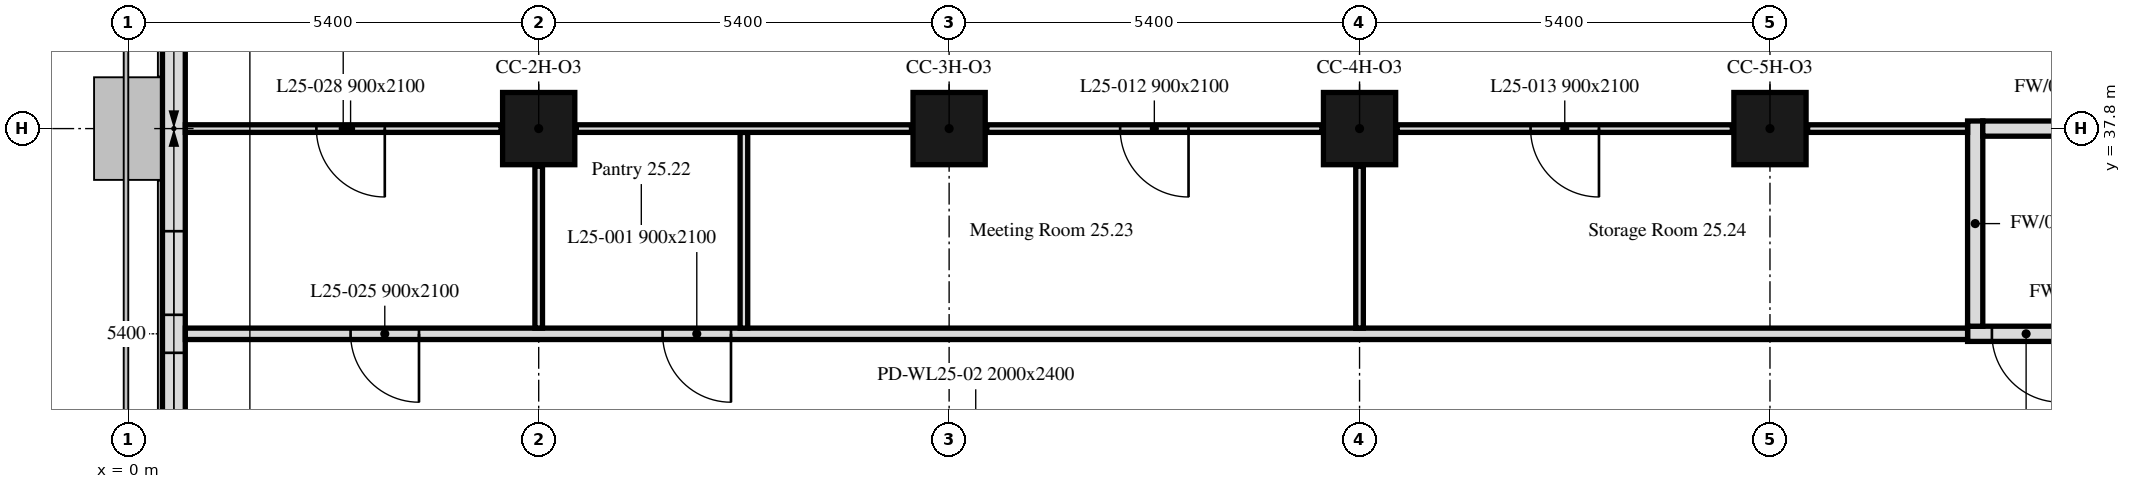
"""IFC4 building model, lengths in metres.
Left out: names, types, materials, properties, quantities, classifications, styles, units other than length and angle.
Written with IfcOpenShell. Run it as: python <this file> out.ifc"""

import sys

from ifc_helpers import new_model, si_unit, direction, frame, frame_2d, origin, origin_2d, place, context, subcontext, project, spatial, rectangle, extrude, element, fill, save


model = new_model("IFC4")
c1 = context("Model", 3, precision=1e-05, world=origin(), true_north=direction((0.0, 1.0)))
c2 = subcontext(c1, "Body", "Model", "MODEL_VIEW")
j1 = project(units=[si_unit("LENGTHUNIT", "METRE"), si_unit("PLANEANGLEUNIT", "RADIAN")], contexts=[c1])
p1 = place(None, origin())
s1 = spatial("IfcSite", under=j1, at=p1, CompositionType="ELEMENT")
p2 = place(p1, origin())
s2 = spatial("IfcBuilding", under=s1, at=p2, CompositionType="ELEMENT")
p3 = place(p2, frame((0.0, 0.0, 106.8)))
s3 = spatial("IfcBuildingStorey", under=s2, at=p3, CompositionType="ELEMENT", Elevation=106.8)
for number, where, z_axis, x_axis in (
    (1, (5.4, 37.8, 0.0), (0.0, 0.0, 1.0), (1.0, 0.0, 0.0)),
    (2, (10.8, 37.8, 0.0), (0.0, 0.0, 1.0), (1.0, 0.0, 0.0)),
    (3, (16.2, 37.8, 0.0), (0.0, 0.0, 1.0), (1.0, 0.0, 0.0)),
    (4, (21.6, 37.8, 0.0), (0.0, 0.0, 1.0), (1.0, 0.0, 0.0)),
):
    element("IfcColumn", number, at=place(p3, frame(where, z_axis=z_axis, x_axis=x_axis)), inside=s3, PredefinedType="COLUMN", context=c2, shape_type="SweptSolid", body=[
        extrude(rectangle(XDim=0.95, YDim=0.95, at=origin_2d()), origin(), (0.0, 0.0, 1.0), 3.5),
    ])
p4 = place(p3, frame((0.6, 43.014, 0.0), z_axis=(0.0, 0.0, 1.0), x_axis=(0.0, -1.0, 0.0)))
e5 = element("IfcWall", 5, at=p4, inside=s3, PredefinedType="SOLIDWALL", context=c2, shape_type="SweptSolid", body=[
    extrude(rectangle(XDim=32.027, YDim=0.3, at=frame_2d((16.014, 0.0))), origin(), (0.0, 0.0, 1.0), 3.5),
])
p5 = place(p4, frame((6.564, 0.0, 0.9)))
e6 = element("IfcOpeningElement", 6, at=p5, cuts=e5, PredefinedType="OPENING", context=c2, shape_type="SweptSolid", body=[
    extrude(rectangle(XDim=1.1, YDim=1.7, at=frame_2d((0.55, 0.85))), frame((0.0, 0.16, 0.0), z_axis=(0.0, -1.0, 0.0), x_axis=(1.0, 0.0, 0.0)), (0.0, 0.0, 1.0), 0.32),
])
p6 = place(p4, frame((8.164, 0.0, 0.9)))
e7 = element("IfcOpeningElement", 7, at=p6, cuts=e5, PredefinedType="OPENING", context=c2, shape_type="SweptSolid", body=[
    extrude(rectangle(XDim=1.1, YDim=1.7, at=frame_2d((0.55, 0.85))), frame((0.0, 0.16, 0.0), z_axis=(0.0, -1.0, 0.0), x_axis=(1.0, 0.0, 0.0)), (0.0, 0.0, 1.0), 0.32),
])
p7 = place(p4, frame((17.014, 0.0, 0.9)))
e8 = element("IfcOpeningElement", 8, at=p7, cuts=e5, PredefinedType="OPENING", context=c2, shape_type="SweptSolid", body=[
    extrude(rectangle(XDim=3.4, YDim=1.7, at=frame_2d((1.7, 0.85))), frame((0.0, 0.16, 0.0), z_axis=(0.0, -1.0, 0.0), x_axis=(1.0, 0.0, 0.0)), (0.0, 0.0, 1.0), 0.32),
])
p8 = place(p4, frame((28.164, 0.0, 0.9)))
e9 = element("IfcOpeningElement", 9, at=p8, cuts=e5, PredefinedType="OPENING", context=c2, shape_type="SweptSolid", body=[
    extrude(rectangle(XDim=1.1, YDim=1.7, at=frame_2d((0.55, 0.85))), frame((0.0, 0.16, 0.0), z_axis=(0.0, -1.0, 0.0), x_axis=(1.0, 0.0, 0.0)), (0.0, 0.0, 1.0), 0.32),
])
p9 = place(p4, frame((29.764, 0.0, 0.9)))
e10 = element("IfcOpeningElement", 10, at=p9, cuts=e5, PredefinedType="OPENING", context=c2, shape_type="SweptSolid", body=[
    extrude(rectangle(XDim=1.1, YDim=1.7, at=frame_2d((0.55, 0.85))), frame((0.0, 0.16, 0.0), z_axis=(0.0, -1.0, 0.0), x_axis=(1.0, 0.0, 0.0)), (0.0, 0.0, 1.0), 0.32),
])
p10 = place(p3, frame((27.1, 35.1, 0.0), z_axis=(0.0, 0.0, 1.0), x_axis=(-1.0, 0.0, 0.0)))
e11 = element("IfcWall", 11, at=p10, inside=s3, PredefinedType="PARTITIONING", context=c2, shape_type="SweptSolid", body=[
    extrude(rectangle(XDim=2.9, YDim=0.2, at=frame_2d((1.45, 0.0))), origin(), (0.0, 0.0, 1.0), 2.75),
])
p11 = place(p10, frame((1.68, 0.0, 0.0)))
e12 = element("IfcOpeningElement", 12, at=p11, cuts=e11, PredefinedType="OPENING", context=c2, shape_type="SweptSolid", body=[
    extrude(rectangle(XDim=0.9, YDim=2.1, at=frame_2d((0.45, 1.05))), frame((0.0, 0.1, 0.0), z_axis=(0.0, -1.0, 0.0), x_axis=(1.0, 0.0, 0.0)), (0.0, 0.0, 1.0), 0.2),
])
p12 = place(p3, frame((24.2, 35.1, 0.0), z_axis=(0.0, 0.0, 1.0), x_axis=(-1.0, 0.0, 0.0)))
e13 = element("IfcWall", 13, at=p12, inside=s3, PredefinedType="PARTITIONING", context=c2, shape_type="SweptSolid", body=[
    extrude(rectangle(XDim=23.449, YDim=0.15, at=frame_2d((11.725, 0.0))), origin(), (0.0, 0.0, 1.0), 2.75),
])
p13 = place(p12, frame((16.27, 0.0, 0.0)))
e14 = element("IfcOpeningElement", 14, at=p13, cuts=e13, PredefinedType="OPENING", context=c2, shape_type="SweptSolid", body=[
    extrude(rectangle(XDim=0.9, YDim=2.1, at=frame_2d((0.45, 1.05))), frame((0.0, 0.075, 0.0), z_axis=(0.0, -1.0, 0.0), x_axis=(1.0, 0.0, 0.0)), (0.0, 0.0, 1.0), 0.15),
])
p14 = place(p12, frame((20.375, 0.0, 0.0)))
e15 = element("IfcOpeningElement", 15, at=p14, cuts=e13, PredefinedType="OPENING", context=c2, shape_type="SweptSolid", body=[
    extrude(rectangle(XDim=0.9, YDim=2.1, at=frame_2d((0.45, 1.05))), frame((0.0, 0.075, 0.0), z_axis=(0.0, -1.0, 0.0), x_axis=(1.0, 0.0, 0.0)), (0.0, 0.0, 1.0), 0.15),
])
p15 = place(p3, frame((4.905, 37.8, 0.0), z_axis=(0.0, 0.0, 1.0), x_axis=(-1.0, 0.0, 0.0)))
e16 = element("IfcWall", 16, at=p15, inside=s3, PredefinedType="PARTITIONING", context=c2, shape_type="SweptSolid", body=[
    extrude(rectangle(XDim=4.154, YDim=0.1, at=frame_2d((2.077, 0.0))), origin(), (0.0, 0.0, 1.0), 2.75),
])
p16 = place(p15, frame((1.53, 0.0, 0.0)))
e17 = element("IfcOpeningElement", 17, at=p16, cuts=e16, PredefinedType="OPENING", context=c2, shape_type="SweptSolid", body=[
    extrude(rectangle(XDim=0.9, YDim=2.1, at=frame_2d((0.45, 1.05))), frame((0.0, 0.05, 0.0), z_axis=(0.0, -1.0, 0.0), x_axis=(1.0, 0.0, 0.0)), (0.0, 0.0, 1.0), 0.1),
])
p17 = place(p3, frame((5.4, 35.175, 0.0), z_axis=(0.0, 0.0, 1.0), x_axis=(0.0, 1.0, 0.0)))
e18 = element("IfcWall", 18, at=p17, inside=s3, PredefinedType="PARTITIONING", context=c2, shape_type="SweptSolid", body=[
    extrude(rectangle(XDim=2.13, YDim=0.1, at=frame_2d((1.065, 0.0))), origin(), (0.0, 0.0, 1.0), 3.5),
])
p18 = place(p3, frame((8.1, 35.175, 0.0), z_axis=(0.0, 0.0, 1.0), x_axis=(0.0, 1.0, 0.0)))
e19 = element("IfcWall", 19, at=p18, inside=s3, PredefinedType="PARTITIONING", context=c2, shape_type="SweptSolid", body=[
    extrude(rectangle(XDim=2.575, YDim=0.1, at=frame_2d((1.288, 0.0))), origin(), (0.0, 0.0, 1.0), 3.5),
])
p19 = place(p3, frame((16.2, 35.175, 0.0), z_axis=(0.0, 0.0, 1.0), x_axis=(0.0, 1.0, 0.0)))
e20 = element("IfcWall", 20, at=p19, inside=s3, PredefinedType="PARTITIONING", context=c2, shape_type="SweptSolid", body=[
    extrude(rectangle(XDim=2.13, YDim=0.1, at=frame_2d((1.065, 0.0))), origin(), (0.0, 0.0, 1.0), 2.75),
])
p20 = place(p3, frame((15.705, 37.8, 0.0), z_axis=(0.0, 0.0, 1.0), x_axis=(-1.0, 0.0, 0.0)))
e21 = element("IfcWall", 21, at=p20, inside=s3, PredefinedType="PARTITIONING", context=c2, shape_type="SweptSolid", body=[
    extrude(rectangle(XDim=4.41, YDim=0.1, at=frame_2d((2.205, 0.0))), origin(), (0.0, 0.0, 1.0), 2.75),
])
p21 = place(p20, frame((1.755, 0.0, 0.0)))
e22 = element("IfcOpeningElement", 22, at=p21, cuts=e21, PredefinedType="OPENING", context=c2, shape_type="SweptSolid", body=[
    extrude(rectangle(XDim=0.9, YDim=2.1, at=frame_2d((0.45, 1.05))), frame((0.0, 0.05, 0.0), z_axis=(0.0, -1.0, 0.0), x_axis=(1.0, 0.0, 0.0)), (0.0, 0.0, 1.0), 0.1),
])
p22 = place(p3, frame((10.305, 37.8, 0.0), z_axis=(0.0, 0.0, 1.0), x_axis=(-1.0, 0.0, 0.0)))
e23 = element("IfcWall", 23, at=p22, inside=s3, PredefinedType="PARTITIONING", context=c2, shape_type="SweptSolid", body=[
    extrude(rectangle(XDim=4.41, YDim=0.1, at=frame_2d((2.205, 0.0))), origin(), (0.0, 0.0, 1.0), 2.75),
])
p23 = place(p3, frame((24.3, 35.2, 0.0), z_axis=(0.0, 0.0, 1.0), x_axis=(0.0, 1.0, 0.0)))
e24 = element("IfcWall", 24, at=p23, inside=s3, PredefinedType="PARTITIONING", context=c2, shape_type="SweptSolid", body=[
    extrude(rectangle(XDim=2.7, YDim=0.2, at=frame_2d((1.35, 0.0))), origin(), (0.0, 0.0, 1.0), 3.5),
])
p24 = place(p3, frame((24.2, 37.8, 0.0), z_axis=(0.0, 0.0, 1.0), x_axis=(-1.0, 0.0, 0.0)))
e25 = element("IfcWall", 25, at=p24, inside=s3, PredefinedType="PARTITIONING", context=c2, shape_type="SweptSolid", body=[
    extrude(rectangle(XDim=2.105, YDim=0.1, at=frame_2d((1.052, 0.0))), origin(), (0.0, 0.0, 1.0), 3.5),
])
p25 = place(p3, frame((21.105, 37.8, 0.0), z_axis=(0.0, 0.0, 1.0), x_axis=(-1.0, 0.0, 0.0)))
e26 = element("IfcWall", 26, at=p25, inside=s3, PredefinedType="PARTITIONING", context=c2, shape_type="SweptSolid", body=[
    extrude(rectangle(XDim=4.41, YDim=0.1, at=frame_2d((2.205, 0.0))), origin(), (0.0, 0.0, 1.0), 3.5),
])
p26 = place(p25, frame((1.755, 0.0, 0.0)))
e27 = element("IfcOpeningElement", 27, at=p26, cuts=e26, PredefinedType="OPENING", context=c2, shape_type="SweptSolid", body=[
    extrude(rectangle(XDim=0.9, YDim=2.1, at=frame_2d((0.45, 1.05))), frame((0.0, 0.05, 0.0), z_axis=(0.0, -1.0, 0.0), x_axis=(1.0, 0.0, 0.0)), (0.0, 0.0, 1.0), 0.1),
])
p27 = place(p3, frame((26.505, 37.8, 0.0), z_axis=(0.0, 0.0, 1.0), x_axis=(-1.0, 0.0, 0.0)))
e28 = element("IfcWall", 28, at=p27, inside=s3, PredefinedType="PARTITIONING", context=c2, shape_type="SweptSolid", body=[
    extrude(rectangle(XDim=2.105, YDim=0.2, at=frame_2d((1.052, 0.0))), origin(), (0.0, 0.0, 1.0), 3.5),
])
p28 = place(p5, origin())
e29 = element("IfcWindow", 29, at=p28, inside=s3, PartitioningType="SINGLE_PANEL", PredefinedType="WINDOW", context=c2, shape_type="SweptSolid", body=[
    extrude(rectangle(XDim=1.1, YDim=1.7, at=frame_2d((0.55, 0.85))), frame((0.0, 0.03, 0.0), z_axis=(0.0, -1.0, 0.0), x_axis=(1.0, 0.0, 0.0)), (0.0, 0.0, 1.0), 0.06),
])
fill(e6, e29)
p29 = place(p6, origin())
e30 = element("IfcWindow", 30, at=p29, inside=s3, PartitioningType="SINGLE_PANEL", PredefinedType="WINDOW", context=c2, shape_type="SweptSolid", body=[
    extrude(rectangle(XDim=1.1, YDim=1.7, at=frame_2d((0.55, 0.85))), frame((0.0, 0.03, 0.0), z_axis=(0.0, -1.0, 0.0), x_axis=(1.0, 0.0, 0.0)), (0.0, 0.0, 1.0), 0.06),
])
fill(e7, e30)
p30 = place(p13, origin())
e31 = element("IfcDoor", 31, at=p30, inside=s3, OperationType="SINGLE_SWING_RIGHT", PredefinedType="DOOR", context=c2, shape_type="SweptSolid", body=[
    extrude(rectangle(XDim=0.9, YDim=2.1, at=frame_2d((0.45, 1.05))), frame((0.0, 0.025, 0.0), z_axis=(0.0, -1.0, 0.0), x_axis=(1.0, 0.0, 0.0)), (0.0, 0.0, 1.0), 0.05),
])
fill(e14, e31)
p31 = place(p11, origin())
e32 = element("IfcDoor", 32, at=p31, inside=s3, OperationType="SINGLE_SWING_LEFT", PredefinedType="DOOR", context=c2, shape_type="SweptSolid", body=[
    extrude(rectangle(XDim=0.9, YDim=2.1, at=frame_2d((0.45, 1.05))), frame((0.0, 0.025, 0.0), z_axis=(0.0, -1.0, 0.0), x_axis=(1.0, 0.0, 0.0)), (0.0, 0.0, 1.0), 0.05),
])
fill(e12, e32)
p32 = place(p21, origin())
e33 = element("IfcDoor", 33, at=p32, inside=s3, OperationType="SINGLE_SWING_LEFT", PredefinedType="DOOR", context=c2, shape_type="SweptSolid", body=[
    extrude(rectangle(XDim=0.9, YDim=2.1, at=frame_2d((0.45, 1.05))), frame((0.0, 0.025, 0.0), z_axis=(0.0, -1.0, 0.0), x_axis=(1.0, 0.0, 0.0)), (0.0, 0.0, 1.0), 0.05),
])
fill(e22, e33)
p33 = place(p26, origin())
e34 = element("IfcDoor", 34, at=p33, inside=s3, OperationType="SINGLE_SWING_RIGHT", PredefinedType="DOOR", context=c2, shape_type="SweptSolid", body=[
    extrude(rectangle(XDim=0.9, YDim=2.1, at=frame_2d((0.45, 1.05))), frame((0.0, 0.025, 0.0), z_axis=(0.0, -1.0, 0.0), x_axis=(1.0, 0.0, 0.0)), (0.0, 0.0, 1.0), 0.05),
])
fill(e27, e34)
p34 = place(p14, origin())
e35 = element("IfcDoor", 35, at=p34, inside=s3, OperationType="SINGLE_SWING_RIGHT", PredefinedType="DOOR", context=c2, shape_type="SweptSolid", body=[
    extrude(rectangle(XDim=0.9, YDim=2.1, at=frame_2d((0.45, 1.05))), frame((0.0, 0.025, 0.0), z_axis=(0.0, -1.0, 0.0), x_axis=(1.0, 0.0, 0.0)), (0.0, 0.0, 1.0), 0.05),
])
fill(e15, e35)
p35 = place(p16, origin())
e36 = element("IfcDoor", 36, at=p35, inside=s3, OperationType="SINGLE_SWING_RIGHT", PredefinedType="DOOR", context=c2, shape_type="SweptSolid", body=[
    extrude(rectangle(XDim=0.9, YDim=2.1, at=frame_2d((0.45, 1.05))), frame((0.0, 0.025, 0.0), z_axis=(0.0, -1.0, 0.0), x_axis=(1.0, 0.0, 0.0)), (0.0, 0.0, 1.0), 0.05),
])
fill(e17, e36)
save(model, sys.argv[1])
